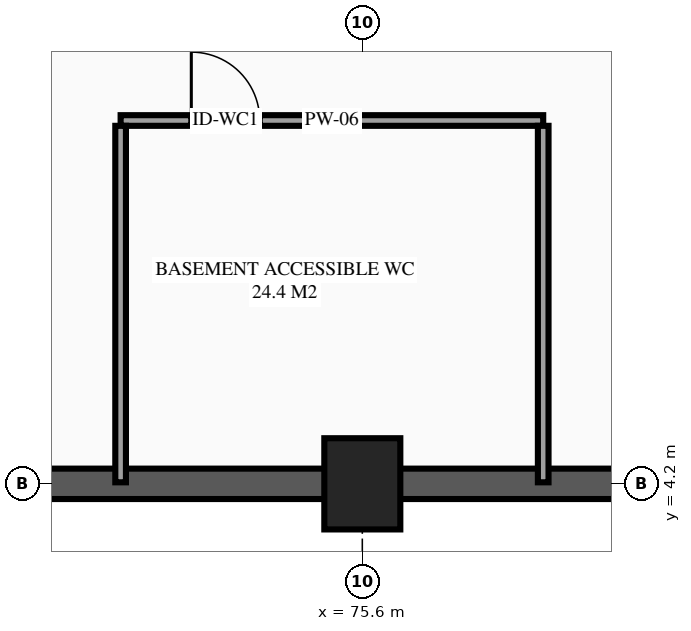
"""IFC4 building model, lengths in metres.
Left out: names, types, materials, properties, quantities, classifications, styles, units other than length and angle.
Written with IfcOpenShell. Run it as: python <this file> out.ifc"""

import sys

from ifc_helpers import new_model, si_unit, direction, frame, frame_2d, origin, origin_2d, place, context, subcontext, project, spatial, rectangle, extrude, element, fill, save


model = new_model("IFC4")
c1 = context("Model", 3, precision=1e-05, world=origin(), true_north=direction((0.0, 1.0)))
c2 = subcontext(c1, "Body", "Model", "MODEL_VIEW")
j1 = project(units=[si_unit("LENGTHUNIT", "METRE"), si_unit("PLANEANGLEUNIT", "RADIAN")], contexts=[c1])
p1 = place(None, origin())
s1 = spatial("IfcSite", under=j1, at=p1, CompositionType="ELEMENT")
p2 = place(p1, origin())
s2 = spatial("IfcBuilding", under=s1, at=p2, CompositionType="ELEMENT")
p3 = place(p2, frame((0.0, 0.0, -4.5)))
s3 = spatial("IfcBuildingStorey", under=s2, at=p3, CompositionType="ELEMENT", Elevation=-4.5)
p4 = place(p3, frame((75.6, 4.2, -0.36), z_axis=(0.0, 0.0, 1.0), x_axis=(1.0, 0.0, 0.0)))
e1 = element("IfcColumn", 1, at=p4, inside=s3, PredefinedType="COLUMN", context=c2, shape_type="SweptSolid", body=[
    extrude(rectangle(XDim=1.0, YDim=1.2, at=origin_2d()), origin(), (0.0, 0.0, 1.0), 4.86),
])
p5 = place(p3, frame((16.8, 4.2, -0.36), z_axis=(0.0, 0.0, 1.0), x_axis=(1.0, 0.0, 0.0)))
e2 = element("IfcWall", 2, at=p5, inside=s3, PredefinedType="STANDARD", context=c2, shape_type="SweptSolid", body=[
    extrude(rectangle(XDim=159.6, YDim=0.4, at=frame_2d((79.8, 0.0))), origin(), (0.0, 0.0, 1.0), 4.86),
])
p6 = place(p3, frame((72.42, 8.98, 0.0), z_axis=(0.0, 0.0, 1.0), x_axis=(1.0, 0.0, 0.0)))
e3 = element("IfcWall", 3, at=p6, inside=s3, PredefinedType="PARTITIONING", context=c2, shape_type="SweptSolid", body=[
    extrude(rectangle(XDim=5.56, YDim=0.14, at=frame_2d((2.78, 0.0))), origin(), (0.0, 0.0, 1.0), 4.175),
])
p7 = place(p6, frame((0.93, 0.0, 0.0)))
e4 = element("IfcOpeningElement", 4, at=p7, cuts=e3, PredefinedType="OPENING", context=c2, shape_type="SweptSolid", body=[
    extrude(rectangle(XDim=0.9, YDim=2.12, at=frame_2d((0.45, 1.06))), frame((0.0, 0.08, 0.0), z_axis=(0.0, -1.0, 0.0), x_axis=(1.0, 0.0, 0.0)), (0.0, 0.0, 1.0), 0.16),
])
for number, where, z_axis, x_axis in (
    (5, (72.42, 4.22, 0.0), (0.0, 0.0, 1.0), (0.0, 1.0, 0.0)),
    (6, (77.98, 4.22, 0.0), (0.0, 0.0, 1.0), (0.0, 1.0, 0.0)),
):
    element("IfcWall", number, at=place(p3, frame(where, z_axis=z_axis, x_axis=x_axis)), inside=s3, PredefinedType="PARTITIONING", context=c2, shape_type="SweptSolid", body=[
        extrude(rectangle(XDim=4.69, YDim=0.14, at=frame_2d((2.345, 0.0))), origin(), (0.0, 0.0, 1.0), 4.175),
    ])
p8 = place(p7, origin())
e7 = element("IfcDoor", 7, at=p8, inside=s3, OperationType="SINGLE_SWING_LEFT", PredefinedType="DOOR", context=c2, shape_type="SweptSolid", body=[
    extrude(rectangle(XDim=0.9, YDim=2.12, at=frame_2d((0.45, 1.06))), frame((0.0, 0.025, 0.0), z_axis=(0.0, -1.0, 0.0), x_axis=(1.0, 0.0, 0.0)), (0.0, 0.0, 1.0), 0.05),
])
fill(e4, e7)
save(model, sys.argv[1])
